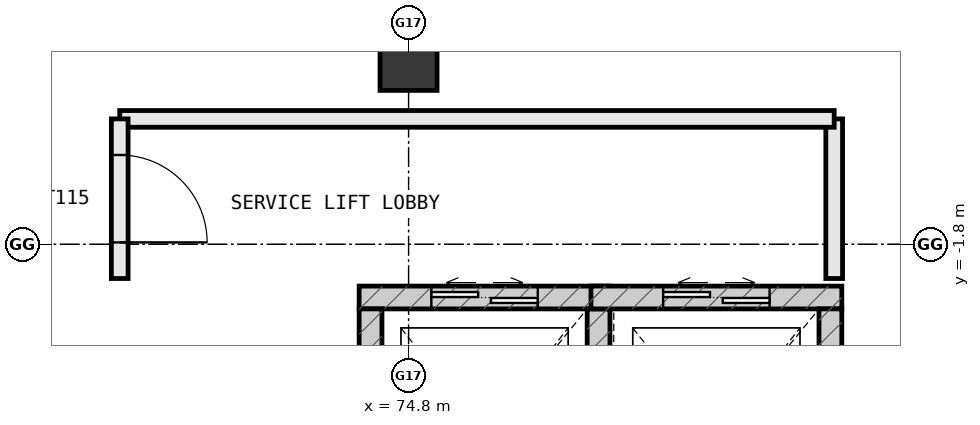
"""IFC4 building model, lengths in metres.
Left out: names, types, materials, properties, quantities, classifications, styles, units other than length and angle.
Written with IfcOpenShell. Run it as: python <this file> out.ifc"""

import sys

from ifc_helpers import new_model, si_unit, direction, frame, frame_2d, origin, origin_2d, place, context, subcontext, project, spatial, rectangle, extrude, element, fill, save


model = new_model("IFC4")
c1 = context("Model", 3, precision=1e-05, world=origin(), true_north=direction((0.0, 1.0)))
c2 = subcontext(c1, "Body", "Model", "MODEL_VIEW")
j1 = project(units=[si_unit("LENGTHUNIT", "METRE"), si_unit("PLANEANGLEUNIT", "RADIAN")], contexts=[c1])
p1 = place(None, origin())
s1 = spatial("IfcSite", under=j1, at=p1, CompositionType="ELEMENT")
p2 = place(p1, origin())
s2 = spatial("IfcBuilding", under=s1, at=p2, CompositionType="ELEMENT")
p3 = place(p2, frame((0.0, 0.0, 5.4)))
s3 = spatial("IfcBuildingStorey", under=s2, at=p3, CompositionType="ELEMENT", Elevation=5.4)
p4 = place(p3, frame((74.8, 0.6, 0.0), z_axis=(0.0, 0.0, 1.0), x_axis=(1.0, 0.0, 0.0)))
e1 = element("IfcColumn", 1, at=p4, inside=s3, PredefinedType="COLUMN", context=c2, shape_type="SweptSolid", body=[
    extrude(rectangle(XDim=0.75, YDim=0.75, at=origin_2d()), origin(), (0.0, 0.0, 1.0), 5.4),
])
p5 = place(p3, frame((77.45, -2.5, 0.0), z_axis=(0.0, 0.0, 1.0), x_axis=(-1.0, 0.0, 0.0)))
e2 = element("IfcWall", 2, at=p5, inside=s3, PredefinedType="SHEAR", context=c2, shape_type="SweptSolid", body=[
    extrude(rectangle(XDim=3.3, YDim=0.3, at=frame_2d((1.65, 0.0))), origin(), (0.0, 0.0, 1.0), 5.4),
])
p6 = place(p5, frame((0.95, 0.0, 0.0)))
e3 = element("IfcOpeningElement", 3, at=p6, cuts=e2, PredefinedType="OPENING", context=c2, shape_type="SweptSolid", body=[
    extrude(rectangle(XDim=1.4, YDim=2.2, at=frame_2d((0.7, 1.1))), frame((0.0, 0.162, 0.0), z_axis=(0.0, -1.0, 0.0), x_axis=(1.0, 0.0, 0.0)), (0.0, 0.0, 1.0), 0.324),
])
for number, where, z_axis, x_axis in (
    (4, (77.3, -5.95, 0.0), (0.0, 0.0, 1.0), (0.0, 1.0, 0.0)),
    (5, (74.3, -2.65, 0.0), (0.0, 0.0, 1.0), (0.0, -1.0, 0.0)),
):
    element("IfcWall", number, at=place(p3, frame(where, z_axis=z_axis, x_axis=x_axis)), inside=s3, PredefinedType="SHEAR", context=c2, shape_type="SweptSolid", body=[
        extrude(rectangle(XDim=3.3, YDim=0.3, at=frame_2d((1.65, 0.0))), origin(), (0.0, 0.0, 1.0), 5.4),
    ])
p7 = place(p3, frame((80.5, -2.5, 0.0), z_axis=(0.0, 0.0, 1.0), x_axis=(-1.0, 0.0, 0.0)))
e6 = element("IfcWall", 6, at=p7, inside=s3, PredefinedType="SHEAR", context=c2, shape_type="SweptSolid", body=[
    extrude(rectangle(XDim=3.3, YDim=0.3, at=frame_2d((1.65, 0.0))), origin(), (0.0, 0.0, 1.0), 5.4),
])
p8 = place(p7, frame((0.95, 0.0, 0.0)))
e7 = element("IfcOpeningElement", 7, at=p8, cuts=e6, PredefinedType="OPENING", context=c2, shape_type="SweptSolid", body=[
    extrude(rectangle(XDim=1.4, YDim=2.2, at=frame_2d((0.7, 1.1))), frame((0.0, 0.162, 0.0), z_axis=(0.0, -1.0, 0.0), x_axis=(1.0, 0.0, 0.0)), (0.0, 0.0, 1.0), 0.324),
])
p9 = place(p3, frame((80.35, -5.95, 0.0), z_axis=(0.0, 0.0, 1.0), x_axis=(0.0, 1.0, 0.0)))
e8 = element("IfcWall", 8, at=p9, inside=s3, PredefinedType="SHEAR", context=c2, shape_type="SweptSolid", body=[
    extrude(rectangle(XDim=3.3, YDim=0.3, at=frame_2d((1.65, 0.0))), origin(), (0.0, 0.0, 1.0), 5.4),
])
p10 = place(p3, frame((80.4, -2.25, 0.0), z_axis=(0.0, 0.0, 1.0), x_axis=(0.0, 1.0, 0.0)))
e9 = element("IfcWall", 9, at=p10, inside=s3, PredefinedType="STANDARD", context=c2, shape_type="SweptSolid", body=[
    extrude(rectangle(XDim=2.1, YDim=0.22, at=frame_2d((1.05, 0.0))), origin(), (0.0, 0.0, 1.0), 5.13),
])
p11 = place(p3, frame((80.4, -0.15, 0.0), z_axis=(0.0, 0.0, 1.0), x_axis=(-1.0, 0.0, 0.0)))
e10 = element("IfcWall", 10, at=p11, inside=s3, PredefinedType="STANDARD", context=c2, shape_type="SweptSolid", body=[
    extrude(rectangle(XDim=9.4, YDim=0.22, at=frame_2d((4.7, 0.0))), origin(), (0.0, 0.0, 1.0), 5.13),
])
p12 = place(p3, frame((71.0, -0.15, 0.0), z_axis=(0.0, 0.0, 1.0), x_axis=(0.0, -1.0, 0.0)))
e11 = element("IfcWall", 11, at=p12, inside=s3, PredefinedType="STANDARD", context=c2, shape_type="SweptSolid", body=[
    extrude(rectangle(XDim=2.1, YDim=0.22, at=frame_2d((1.05, 0.0))), origin(), (0.0, 0.0, 1.0), 5.13),
])
p13 = place(p12, frame((0.475, 0.0, 0.0)))
e12 = element("IfcOpeningElement", 12, at=p13, cuts=e11, PredefinedType="OPENING", context=c2, shape_type="SweptSolid", body=[
    extrude(rectangle(XDim=1.15, YDim=2.2, at=frame_2d((0.575, 1.1))), frame((0.0, 0.122, 0.0), z_axis=(0.0, -1.0, 0.0), x_axis=(1.0, 0.0, 0.0)), (0.0, 0.0, 1.0), 0.244),
])
p14 = place(p6, origin())
e13 = element("IfcDoor", 13, at=p14, inside=s3, OperationType="DOUBLE_DOOR_SLIDING", PredefinedType="DOOR", context=c2, shape_type="SweptSolid", body=[
    extrude(rectangle(XDim=1.4, YDim=2.2, at=frame_2d((0.7, 1.1))), frame((0.0, 0.025, 0.0), z_axis=(0.0, -1.0, 0.0), x_axis=(1.0, 0.0, 0.0)), (0.0, 0.0, 1.0), 0.05),
])
fill(e3, e13)
p15 = place(p8, origin())
e14 = element("IfcDoor", 14, at=p15, inside=s3, OperationType="DOUBLE_DOOR_SLIDING", PredefinedType="DOOR", context=c2, shape_type="SweptSolid", body=[
    extrude(rectangle(XDim=1.4, YDim=2.2, at=frame_2d((0.7, 1.1))), frame((0.0, 0.025, 0.0), z_axis=(0.0, -1.0, 0.0), x_axis=(1.0, 0.0, 0.0)), (0.0, 0.0, 1.0), 0.05),
])
fill(e7, e14)
p16 = place(p13, origin())
e15 = element("IfcDoor", 15, at=p16, inside=s3, OperationType="SINGLE_SWING_RIGHT", PredefinedType="DOOR", context=c2, shape_type="SweptSolid", body=[
    extrude(rectangle(XDim=1.15, YDim=2.2, at=frame_2d((0.575, 1.1))), frame((0.0, 0.025, 0.0), z_axis=(0.0, -1.0, 0.0), x_axis=(1.0, 0.0, 0.0)), (0.0, 0.0, 1.0), 0.05),
])
fill(e12, e15)
save(model, sys.argv[1])
